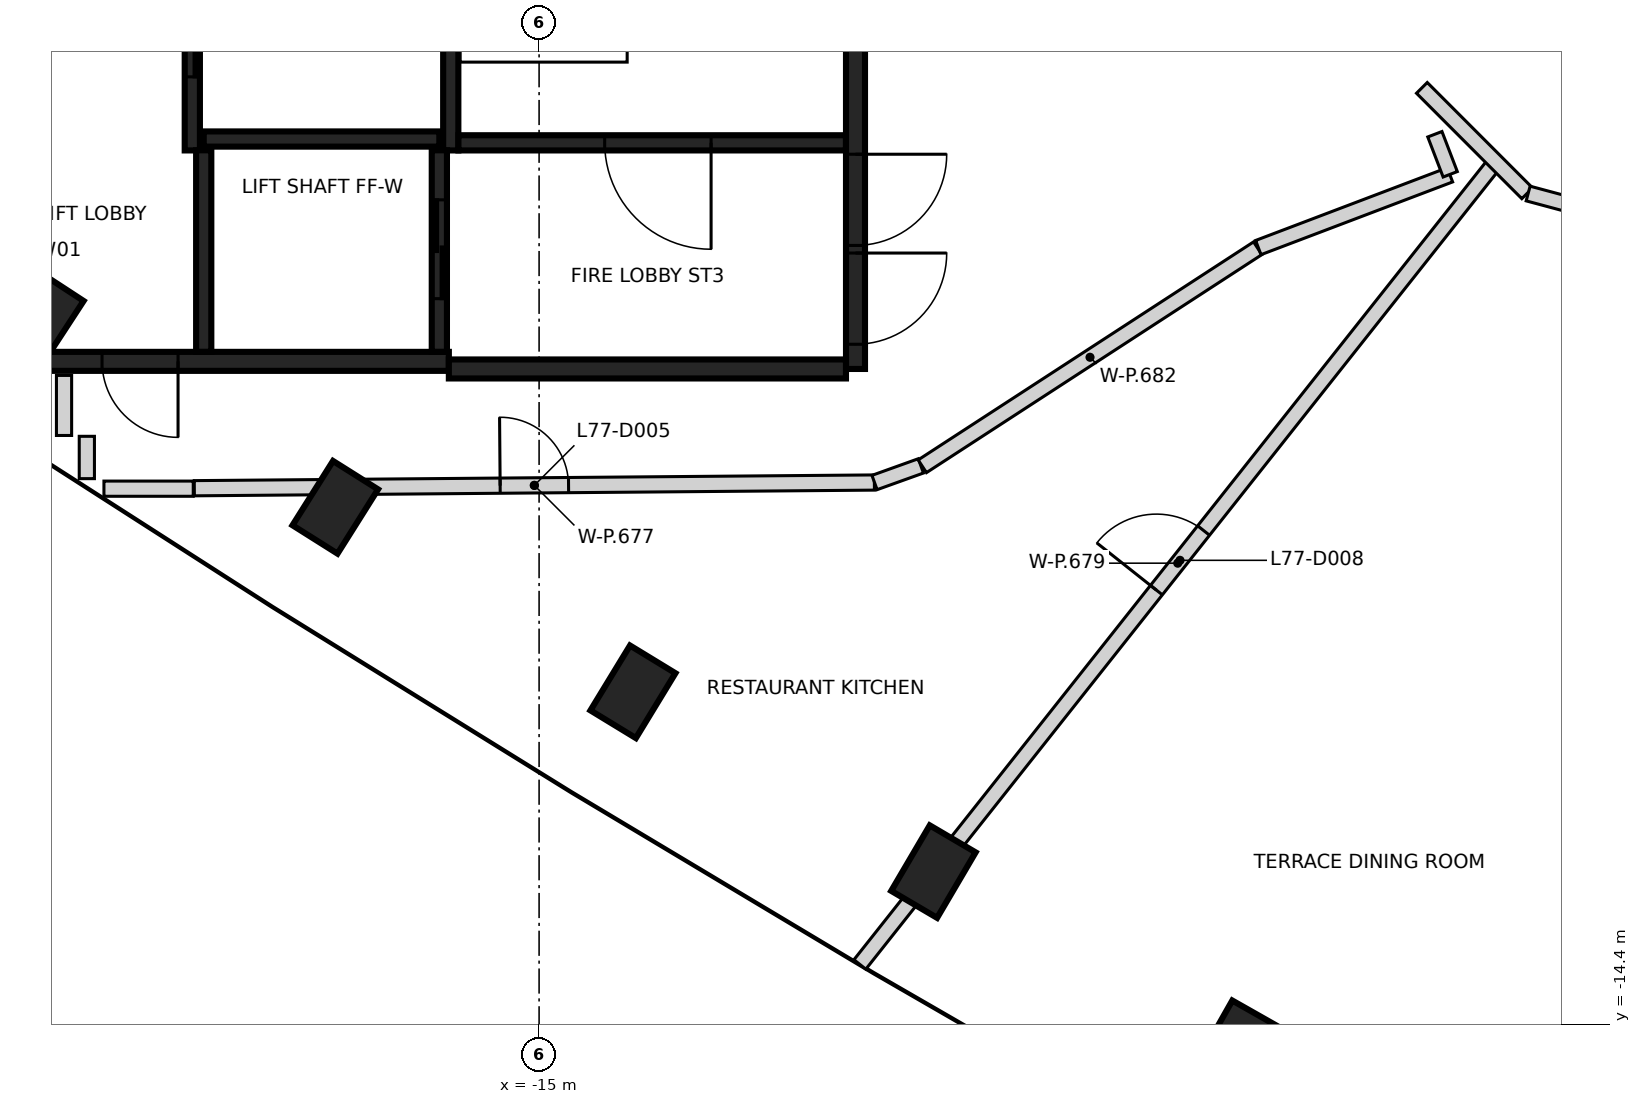
"""IFC4 building model, lengths in metres.
Left out: names, types, materials, properties, quantities, classifications, styles, units other than length and angle.
Written with IfcOpenShell. Run it as: python <this file> out.ifc"""

import sys

from ifc_helpers import new_model, si_unit, direction, frame, frame_2d, origin, origin_2d, place, context, subcontext, project, spatial, rectangle, extrude, element, fill, save


model = new_model("IFC4")
c1 = context("Model", 3, precision=1e-05, world=origin(), true_north=direction((0.0, 1.0)))
c2 = subcontext(c1, "Body", "Model", "MODEL_VIEW")
j1 = project(units=[si_unit("LENGTHUNIT", "METRE"), si_unit("PLANEANGLEUNIT", "RADIAN")], contexts=[c1])
p1 = place(None, origin())
s1 = spatial("IfcSite", under=j1, at=p1, CompositionType="ELEMENT")
p2 = place(p1, origin())
s2 = spatial("IfcBuilding", under=s1, at=p2, CompositionType="ELEMENT")
p3 = place(p2, frame((0.0, 0.0, 306.6)))
s3 = spatial("IfcBuildingStorey", under=s2, at=p3, CompositionType="ELEMENT", Elevation=306.6)
for number, where, z_axis, x_axis in (
    (1, (-21.559, -5.107, -0.35), (0.0, 0.0, 1.0), (0.547, 0.837, 0.0)),
    (2, (-17.681, -7.595, -0.35), (0.0, 0.0, 1.0), (0.533, 0.846, 0.0)),
    (3, (-13.765, -10.022, -0.35), (0.0, 0.0, 1.0), (0.52, 0.854, 0.0)),
    (4, (-9.812, -12.388, -0.35), (0.0, 0.0, 1.0), (0.507, 0.862, 0.0)),
    (5, (-5.822, -14.691, -0.35), (0.0, 0.0, 1.0), (0.493, 0.87, 0.0)),
):
    element("IfcColumn", number, at=place(p3, frame(where, z_axis=z_axis, x_axis=x_axis)), inside=s3, PredefinedType="COLUMN", context=c2, shape_type="SweptSolid", body=[
        extrude(rectangle(XDim=1.0, YDim=0.7, at=origin_2d()), origin(), (0.0, 0.0, 1.0), 6.0),
    ])
p4 = place(p3, frame((-10.837, 5.775, 0.0), z_axis=(0.0, 0.0, 1.0), x_axis=(0.0, -1.0, 0.0)))
e6 = element("IfcWall", 6, at=p4, inside=s3, PredefinedType="SHEAR", context=c2, shape_type="SweptSolid", body=[
    extrude(rectangle(XDim=11.55, YDim=0.25, at=frame_2d((5.775, 0.0))), origin(), (0.0, 0.0, 1.0), 5.65),
])
p5 = place(p4, frame((10.025, 0.0, 0.0)))
e7 = element("IfcOpeningElement", 7, at=p5, cuts=e6, PredefinedType="OPENING", context=c2, shape_type="SweptSolid", body=[
    extrude(rectangle(XDim=1.2, YDim=2.1, at=frame_2d((0.6, 1.05))), frame((0.0, 0.135, 0.0), z_axis=(0.0, -1.0, 0.0), x_axis=(1.0, 0.0, 0.0)), (0.0, 0.0, 1.0), 0.27),
])
p6 = place(p4, frame((8.725, 0.0, 0.0)))
e8 = element("IfcOpeningElement", 8, at=p6, cuts=e6, PredefinedType="OPENING", context=c2, shape_type="SweptSolid", body=[
    extrude(rectangle(XDim=1.2, YDim=2.1, at=frame_2d((0.6, 1.05))), frame((0.0, 0.135, 0.0), z_axis=(0.0, -1.0, 0.0), x_axis=(1.0, 0.0, 0.0)), (0.0, 0.0, 1.0), 0.27),
])
p7 = place(p3, frame((-16.187, -5.675, 0.0), z_axis=(0.0, 0.0, 1.0), x_axis=(-1.0, 0.0, 0.0)))
e9 = element("IfcWall", 9, at=p7, inside=s3, PredefinedType="SHEAR", context=c2, shape_type="SweptSolid", body=[
    extrude(rectangle(XDim=6.125, YDim=0.25, at=frame_2d((3.062, 0.0))), origin(), (0.0, 0.0, 1.0), 5.65),
])
p8 = place(p7, frame((3.563, 0.0, 0.0)))
e10 = element("IfcOpeningElement", 10, at=p8, cuts=e9, PredefinedType="OPENING", context=c2, shape_type="SweptSolid", body=[
    extrude(rectangle(XDim=1.0, YDim=2.1, at=frame_2d((0.5, 1.05))), frame((0.0, 0.135, 0.0), z_axis=(0.0, -1.0, 0.0), x_axis=(1.0, 0.0, 0.0)), (0.0, 0.0, 1.0), 0.27),
])
p9 = place(p3, frame((-10.963, -5.775, 0.0), z_axis=(0.0, 0.0, 1.0), x_axis=(-1.0, 0.0, 0.0)))
e11 = element("IfcWall", 11, at=p9, inside=s3, PredefinedType="SHEAR", context=c2, shape_type="SweptSolid", body=[
    extrude(rectangle(XDim=5.225, YDim=0.25, at=frame_2d((2.612, 0.0))), origin(), (0.0, 0.0, 1.0), 5.65),
])
p10 = place(p3, frame((-16.162, 3.074, 0.0), z_axis=(0.0, 0.0, 1.0), x_axis=(0.0, -1.0, 0.0)))
e12 = element("IfcWall", 12, at=p10, inside=s3, PredefinedType="SHEAR", context=c2, shape_type="SweptSolid", body=[
    extrude(rectangle(XDim=5.974, YDim=0.2, at=frame_2d((2.987, 0.0))), origin(), (0.0, 0.0, 1.0), 5.65),
])
p11 = place(p3, frame((-19.562, -2.9, 0.0), z_axis=(0.0, 0.0, 1.0), x_axis=(0.0, 1.0, 0.0)))
e13 = element("IfcWall", 13, at=p11, inside=s3, PredefinedType="SHEAR", context=c2, shape_type="SweptSolid", body=[
    extrude(rectangle(XDim=6.1, YDim=0.2, at=frame_2d((3.05, 0.0))), origin(), (0.0, 0.0, 1.0), 5.65),
])
p12 = place(p11, frame((3.95, 0.0, 0.0)))
e14 = element("IfcOpeningElement", 14, at=p12, cuts=e13, PredefinedType="OPENING", context=c2, shape_type="SweptSolid", body=[
    extrude(rectangle(XDim=1.1, YDim=2.1, at=frame_2d((0.55, 1.05))), frame((0.0, 0.11, 0.0), z_axis=(0.0, -1.0, 0.0), x_axis=(1.0, 0.0, 0.0)), (0.0, 0.0, 1.0), 0.22),
])
p13 = place(p11, frame((0.968, 0.0, 0.0)))
e15 = element("IfcOpeningElement", 15, at=p13, cuts=e13, PredefinedType="OPENING", context=c2, shape_type="SweptSolid", body=[
    extrude(rectangle(XDim=1.1, YDim=2.1, at=frame_2d((0.55, 1.05))), frame((0.0, 0.11, 0.0), z_axis=(0.0, -1.0, 0.0), x_axis=(1.0, 0.0, 0.0)), (0.0, 0.0, 1.0), 0.22),
])
p14 = place(p3, frame((-10.963, -2.8, 0.0), z_axis=(0.0, 0.0, 1.0), x_axis=(-1.0, 0.0, 0.0)))
e16 = element("IfcWall", 16, at=p14, inside=s3, PredefinedType="SHEAR", context=c2, shape_type="SweptSolid", body=[
    extrude(rectangle(XDim=5.098, YDim=0.2, at=frame_2d((2.549, 0.0))), origin(), (0.0, 0.0, 1.0), 5.65),
])
p15 = place(p14, frame((1.774, 0.0, 0.0)))
e17 = element("IfcOpeningElement", 17, at=p15, cuts=e16, PredefinedType="OPENING", context=c2, shape_type="SweptSolid", body=[
    extrude(rectangle(XDim=1.4, YDim=2.1, at=frame_2d((0.7, 1.05))), frame((0.0, 0.11, 0.0), z_axis=(0.0, -1.0, 0.0), x_axis=(1.0, 0.0, 0.0)), (0.0, 0.0, 1.0), 0.22),
])
p16 = place(p3, frame((-19.412, -2.75, 0.0), z_axis=(0.0, 0.0, 1.0), x_axis=(1.0, 0.0, 0.0)))
e18 = element("IfcWall", 18, at=p16, inside=s3, PredefinedType="SHEAR", context=c2, shape_type="SweptSolid", body=[
    extrude(rectangle(XDim=3.1, YDim=0.2, at=frame_2d((1.55, 0.0))), origin(), (0.0, 0.0, 1.0), 5.65),
])
p17 = place(p3, frame((-16.312, -2.898, 0.0), z_axis=(0.0, 0.0, 1.0), x_axis=(0.0, -1.0, 0.0)))
e19 = element("IfcWall", 19, at=p17, inside=s3, PredefinedType="SHEAR", context=c2, shape_type="SweptSolid", body=[
    extrude(rectangle(XDim=2.651, YDim=0.2, at=frame_2d((1.325, 0.0))), origin(), (0.0, 0.0, 1.0), 5.65),
])
p18 = place(p17, frame((0.652, 0.0, 0.0)))
e20 = element("IfcOpeningElement", 20, at=p18, cuts=e19, PredefinedType="OPENING", context=c2, shape_type="SweptSolid", body=[
    extrude(rectangle(XDim=1.3, YDim=2.1, at=frame_2d((0.65, 1.05))), frame((0.0, 0.11, 0.0), z_axis=(0.0, -1.0, 0.0), x_axis=(1.0, 0.0, 0.0)), (0.0, 0.0, 1.0), 0.22),
])
p19 = place(p3, frame((-19.412, -5.549, 0.0), z_axis=(0.0, 0.0, 1.0), x_axis=(0.0, 1.0, 0.0)))
e21 = element("IfcWall", 21, at=p19, inside=s3, PredefinedType="SHEAR", context=c2, shape_type="SweptSolid", body=[
    extrude(rectangle(XDim=2.651, YDim=0.2, at=frame_2d((1.325, 0.0))), origin(), (0.0, 0.0, 1.0), 5.65),
])
p20 = place(p3, frame((-21.25, -6.65, 0.0), z_axis=(0.0, 0.0, 1.0), x_axis=(0.0, 1.0, 0.0)))
e22 = element("IfcWall", 22, at=p20, inside=s3, PredefinedType="PARTITIONING", context=c2, shape_type="SweptSolid", body=[
    extrude(rectangle(XDim=0.79, YDim=0.2, at=frame_2d((0.395, 0.0))), origin(), (0.0, 0.0, 1.0), 5.65),
])
p21 = place(p3, frame((-20.95, -7.218, 0.0), z_axis=(0.0, 0.0, 1.0), x_axis=(0.0, 1.0, 0.0)))
e23 = element("IfcWall", 23, at=p21, inside=s3, PredefinedType="PARTITIONING", context=c2, shape_type="SweptSolid", body=[
    extrude(rectangle(XDim=0.557, YDim=0.2, at=frame_2d((0.279, 0.0))), origin(), (0.0, 0.0, 1.0), 5.65),
])
p22 = place(p3, frame((-20.725, -7.35, 0.0), z_axis=(0.0, 0.0, 1.0), x_axis=(1.0, 0.0, 0.0)))
e24 = element("IfcWall", 24, at=p22, inside=s3, PredefinedType="PARTITIONING", context=c2, shape_type="SweptSolid", body=[
    extrude(rectangle(XDim=1.175, YDim=0.2, at=frame_2d((0.587, 0.0))), origin(), (0.0, 0.0, 1.0), 5.65),
])
p23 = place(p3, frame((-19.536, -7.344, 0.0), z_axis=(0.0, 0.0, 1.0), x_axis=(0.99996491102, 0.008377155152, 0.0)))
e25 = element("IfcWall", 25, at=p23, inside=s3, PredefinedType="PARTITIONING", context=c2, shape_type="SweptSolid", body=[
    extrude(rectangle(XDim=8.947, YDim=0.2, at=frame_2d((4.474, 0.0))), origin(), (0.0, 0.0, 1.0), 4.75),
])
p24 = place(p23, frame((4.024, 0.0, 0.0)))
e26 = element("IfcOpeningElement", 26, at=p24, cuts=e25, PredefinedType="OPENING", context=c2, shape_type="SweptSolid", body=[
    extrude(rectangle(XDim=0.9, YDim=2.1, at=frame_2d((0.45, 1.05))), frame((0.0, 0.11, 0.0), z_axis=(0.0, -1.0, 0.0), x_axis=(1.0, 0.0, 0.0)), (0.0, 0.0, 1.0), 0.22),
])
p25 = place(p3, frame((-10.78, -13.609, 0.0), z_axis=(0.0, 0.0, 1.0), x_axis=(0.620923442864, 0.783871212702, 0.0)))
e27 = element("IfcWall", 27, at=p25, inside=s3, PredefinedType="PARTITIONING", context=c2, shape_type="SweptSolid", body=[
    extrude(rectangle(XDim=13.469, YDim=0.2, at=frame_2d((6.735, 0.0))), origin(), (0.0, 0.0, 1.0), 5.65),
])
p26 = place(p25, frame((6.283, 0.0, 0.0)))
e28 = element("IfcOpeningElement", 28, at=p26, cuts=e27, PredefinedType="OPENING", context=c2, shape_type="SweptSolid", body=[
    extrude(rectangle(XDim=1.0, YDim=2.1, at=frame_2d((0.5, 1.05))), frame((0.0, 0.11, 0.0), z_axis=(0.0, -1.0, 0.0), x_axis=(1.0, 0.0, 0.0)), (0.0, 0.0, 1.0), 0.22),
])
p27 = place(p3, frame((-10.587, -7.269, 0.0), z_axis=(0.0, 0.0, 1.0), x_axis=(0.941160873435, 0.337958888499, 0.0)))
e29 = element("IfcWall", 29, at=p27, inside=s3, PredefinedType="PARTITIONING", context=c2, shape_type="SweptSolid", body=[
    extrude(rectangle(XDim=0.648, YDim=0.2, at=frame_2d((0.324, 0.0))), origin(), (0.0, 0.0, 1.0), 5.65),
])
p28 = place(p3, frame((-9.958, -7.055, 0.0), z_axis=(0.0, 0.0, 1.0), x_axis=(0.83844573603, 0.544985089459, 0.0)))
e30 = element("IfcWall", 30, at=p28, inside=s3, PredefinedType="PARTITIONING", context=c2, shape_type="SweptSolid", body=[
    extrude(rectangle(XDim=5.263, YDim=0.2, at=frame_2d((2.631, 0.0))), origin(), (0.0, 0.0, 1.0), 5.65),
])
p29 = place(p3, frame((-5.538, -4.178, 0.0), z_axis=(0.0, 0.0, 1.0), x_axis=(0.934900176388, 0.354910777788, 0.0)))
e31 = element("IfcWall", 31, at=p29, inside=s3, PredefinedType="PARTITIONING", context=c2, shape_type="SweptSolid", body=[
    extrude(rectangle(XDim=2.697, YDim=0.2, at=frame_2d((1.348, 0.0))), origin(), (0.0, 0.0, 1.0), 5.65),
])
p30 = place(p3, frame((-3.386, -2.077, 0.0), z_axis=(0.0, 0.0, 1.0), x_axis=(0.706733144921, -0.707480220127, 0.0)))
e32 = element("IfcWall", 32, at=p30, inside=s3, PredefinedType="PARTITIONING", context=c2, shape_type="SweptSolid", body=[
    extrude(rectangle(XDim=1.961, YDim=0.2, at=frame_2d((0.98, 0.0))), origin(), (0.0, 0.0, 1.0), 5.65),
])
p31 = place(p3, frame((-3.215, -2.687, 0.0), z_axis=(0.0, 0.0, 1.0), x_axis=(0.358080546194, -0.933690699556, 0.0)))
e33 = element("IfcWall", 33, at=p31, inside=s3, PredefinedType="PARTITIONING", context=c2, shape_type="SweptSolid", body=[
    extrude(rectangle(XDim=0.564, YDim=0.2, at=frame_2d((0.282, 0.0))), origin(), (0.0, 0.0, 1.0), 5.65),
])
p32 = place(p3, frame((-1.988, -3.467, 0.0), z_axis=(0.0, 0.0, 1.0), x_axis=(0.965861669228, -0.259058363918, 0.0)))
e34 = element("IfcWall", 34, at=p32, inside=s3, PredefinedType="PARTITIONING", context=c2, shape_type="SweptSolid", body=[
    extrude(rectangle(XDim=2.057, YDim=0.2, at=frame_2d((1.029, 0.0))), origin(), (0.0, 0.0, 1.0), 5.65),
])
p33 = place(p18, origin())
e35 = element("IfcDoor", 35, at=p33, inside=s3, OperationType="SLIDING_TO_LEFT", PredefinedType="DOOR", context=c2, shape_type="SweptSolid", body=[
    extrude(rectangle(XDim=1.3, YDim=2.1, at=frame_2d((0.65, 1.05))), frame((0.0, 0.025, 0.0), z_axis=(0.0, -1.0, 0.0), x_axis=(1.0, 0.0, 0.0)), (0.0, 0.0, 1.0), 0.05),
])
fill(e20, e35)
p34 = place(p13, origin())
e36 = element("IfcDoor", 36, at=p34, inside=s3, OperationType="DOUBLE_DOOR_SLIDING", PredefinedType="DOOR", context=c2, shape_type="SweptSolid", body=[
    extrude(rectangle(XDim=1.1, YDim=2.1, at=frame_2d((0.55, 1.05))), frame((0.0, 0.025, 0.0), z_axis=(0.0, -1.0, 0.0), x_axis=(1.0, 0.0, 0.0)), (0.0, 0.0, 1.0), 0.05),
])
fill(e15, e36)
p35 = place(p8, origin())
e37 = element("IfcDoor", 37, at=p35, inside=s3, OperationType="SINGLE_SWING_LEFT", PredefinedType="DOOR", context=c2, shape_type="SweptSolid", body=[
    extrude(rectangle(XDim=1.0, YDim=2.1, at=frame_2d((0.5, 1.05))), frame((0.0, 0.025, 0.0), z_axis=(0.0, -1.0, 0.0), x_axis=(1.0, 0.0, 0.0)), (0.0, 0.0, 1.0), 0.05),
])
fill(e10, e37)
p36 = place(p5, origin())
e38 = element("IfcDoor", 38, at=p36, inside=s3, OperationType="SINGLE_SWING_LEFT", PredefinedType="DOOR", context=c2, shape_type="SweptSolid", body=[
    extrude(rectangle(XDim=1.2, YDim=2.1, at=frame_2d((0.6, 1.05))), frame((0.0, 0.025, 0.0), z_axis=(0.0, -1.0, 0.0), x_axis=(1.0, 0.0, 0.0)), (0.0, 0.0, 1.0), 0.05),
])
fill(e7, e38)
p37 = place(p6, origin())
e39 = element("IfcDoor", 39, at=p37, inside=s3, OperationType="SINGLE_SWING_RIGHT", PredefinedType="DOOR", context=c2, shape_type="SweptSolid", body=[
    extrude(rectangle(XDim=1.2, YDim=2.1, at=frame_2d((0.6, 1.05))), frame((0.0, 0.025, 0.0), z_axis=(0.0, -1.0, 0.0), x_axis=(1.0, 0.0, 0.0)), (0.0, 0.0, 1.0), 0.05),
])
fill(e8, e39)
p38 = place(p15, origin())
e40 = element("IfcDoor", 40, at=p38, inside=s3, OperationType="SINGLE_SWING_LEFT", PredefinedType="DOOR", context=c2, shape_type="SweptSolid", body=[
    extrude(rectangle(XDim=1.4, YDim=2.1, at=frame_2d((0.7, 1.05))), frame((0.0, 0.025, 0.0), z_axis=(0.0, -1.0, 0.0), x_axis=(1.0, 0.0, 0.0)), (0.0, 0.0, 1.0), 0.05),
])
fill(e17, e40)
p39 = place(p24, frame((0.9, 0.0, 0.0), z_axis=(0.0, 0.0, 1.0), x_axis=(-1.0, 0.0, 0.0)))
e41 = element("IfcDoor", 41, at=p39, inside=s3, OperationType="SINGLE_SWING_LEFT", PredefinedType="DOOR", context=c2, shape_type="SweptSolid", body=[
    extrude(rectangle(XDim=0.9, YDim=2.1, at=frame_2d((0.45, 1.05))), frame((0.0, 0.025, 0.0), z_axis=(0.0, -1.0, 0.0), x_axis=(1.0, 0.0, 0.0)), (0.0, 0.0, 1.0), 0.05),
])
fill(e26, e41)
p40 = place(p26, origin())
e42 = element("IfcDoor", 42, at=p40, inside=s3, OperationType="SINGLE_SWING_LEFT", PredefinedType="DOOR", context=c2, shape_type="SweptSolid", body=[
    extrude(rectangle(XDim=1.0, YDim=2.1, at=frame_2d((0.5, 1.05))), frame((0.0, 0.025, 0.0), z_axis=(0.0, -1.0, 0.0), x_axis=(1.0, 0.0, 0.0)), (0.0, 0.0, 1.0), 0.05),
])
fill(e28, e42)
save(model, sys.argv[1])
